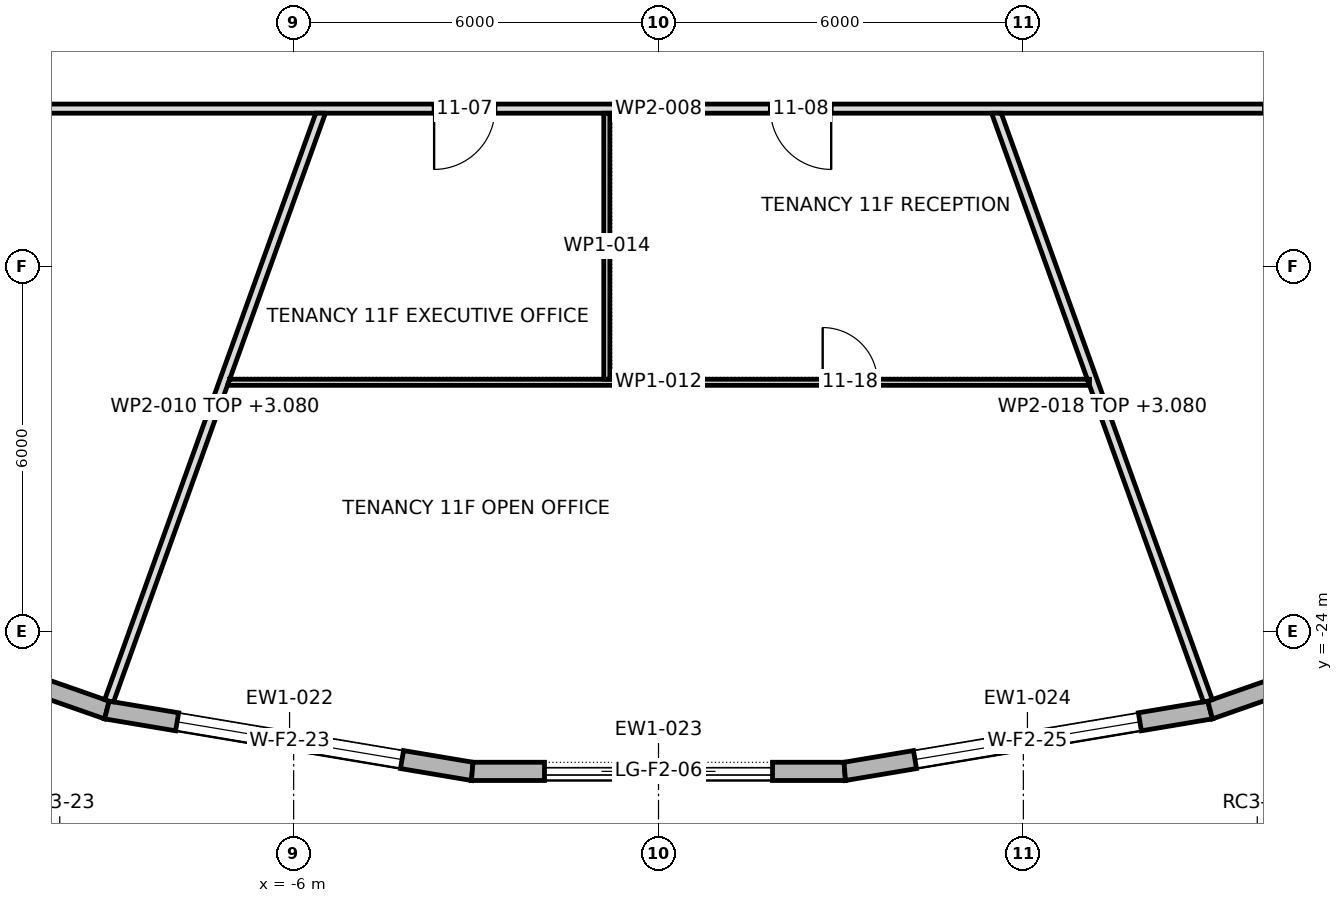
"""IFC4 building model, lengths in metres.
Left out: names, types, materials, properties, quantities, classifications, styles, units other than length and angle.
Written with IfcOpenShell. Run it as: python <this file> out.ifc"""

import sys

from ifc_helpers import new_model, si_unit, direction, frame, frame_2d, origin, place, context, subcontext, project, spatial, polyline, rectangle, outline, extrude, element, fill, save


model = new_model("IFC4")
c1 = context("Model", 3, precision=1e-05, world=origin(), true_north=direction((0.0, 1.0)))
c2 = subcontext(c1, "Body", "Model", "MODEL_VIEW")
j1 = project(units=[si_unit("LENGTHUNIT", "METRE"), si_unit("PLANEANGLEUNIT", "RADIAN")], contexts=[c1])
p1 = place(None, origin())
s1 = spatial("IfcSite", under=j1, at=p1, CompositionType="ELEMENT")
p2 = place(p1, origin())
s2 = spatial("IfcBuilding", under=s1, at=p2, CompositionType="ELEMENT")
p3 = place(p2, frame((0.0, 0.0, 163.3)))
s3 = spatial("IfcBuildingStorey", under=s2, at=p3, CompositionType="ELEMENT", Elevation=163.3)
p4 = place(p3, frame((-14.732, -23.31, 0.0), z_axis=(0.0, 0.0, 1.0), x_axis=(0.943944636678, -0.330103806228, 0.0)))
e1 = element("IfcWall", 1, at=p4, inside=s3, PredefinedType="STANDARD", context=c2, shape_type="SweptSolid", body=[
    extrude(outline(polyline([(-0.013, -0.15), (6.01, -0.15), (5.985, 0.15), (0.013, 0.15), (-0.013, -0.15)])), origin(), (0.0, 0.0, 1.0), 3.85),
])
p5 = place(p4, frame((1.124, 0.0, 0.6)))
e2 = element("IfcOpeningElement", 2, at=p5, cuts=e1, PredefinedType="OPENING", context=c2, shape_type="SweptSolid", body=[
    extrude(rectangle(XDim=3.75, YDim=2.85, at=frame_2d((1.875, 1.425))), frame((0.0, 0.162, 0.0), z_axis=(0.0, -1.0, 0.0), x_axis=(1.0, 0.0, 0.0)), (0.0, 0.0, 1.0), 0.324),
])
p6 = place(p3, frame((-9.071, -25.29, 0.0), z_axis=(0.0, 0.0, 1.0), x_axis=(0.98618955457, -0.165620537547, 0.0)))
e3 = element("IfcWall", 3, at=p6, inside=s3, PredefinedType="STANDARD", context=c2, shape_type="SweptSolid", body=[
    extrude(outline(polyline([(-0.013, -0.15), (6.105, -0.15), (6.08, 0.15), (0.013, 0.15), (-0.013, -0.15)])), origin(), (0.0, 0.0, 1.0), 3.85),
])
p7 = place(p6, frame((1.171, 0.0, 0.6)))
e4 = element("IfcOpeningElement", 4, at=p7, cuts=e3, PredefinedType="OPENING", context=c2, shape_type="SweptSolid", body=[
    extrude(rectangle(XDim=3.75, YDim=2.85, at=frame_2d((1.875, 1.425))), frame((0.0, 0.162, 0.0), z_axis=(0.0, -1.0, 0.0), x_axis=(1.0, 0.0, 0.0)), (0.0, 0.0, 1.0), 0.324),
])
p8 = place(p3, frame((-3.063, -26.299, 0.0), z_axis=(0.0, 0.0, 1.0), x_axis=(1.0, 0.0, 0.0)))
e5 = element("IfcWall", 5, at=p8, inside=s3, PredefinedType="STANDARD", context=c2, shape_type="SweptSolid", body=[
    extrude(outline(polyline([(-0.012, -0.15), (6.138, -0.15), (6.114, 0.15), (0.012, 0.15), (-0.012, -0.15)])), origin(), (0.0, 0.0, 1.0), 3.85),
])
p9 = place(p8, frame((1.188, 0.0, 0.0)))
e6 = element("IfcOpeningElement", 6, at=p9, cuts=e5, PredefinedType="OPENING", context=c2, shape_type="SweptSolid", body=[
    extrude(rectangle(XDim=3.75, YDim=3.45, at=frame_2d((1.875, 1.725))), frame((0.0, 0.162, 0.0), z_axis=(0.0, -1.0, 0.0), x_axis=(1.0, 0.0, 0.0)), (0.0, 0.0, 1.0), 0.324),
])
p10 = place(p3, frame((3.063, -26.299, 0.0), z_axis=(0.0, 0.0, 1.0), x_axis=(0.98618955457, 0.165620537547, 0.0)))
e7 = element("IfcWall", 7, at=p10, inside=s3, PredefinedType="STANDARD", context=c2, shape_type="SweptSolid", body=[
    extrude(outline(polyline([(-0.012, -0.15), (6.105, -0.15), (6.08, 0.15), (0.012, 0.15), (-0.012, -0.15)])), origin(), (0.0, 0.0, 1.0), 3.85),
])
p11 = place(p10, frame((1.171, 0.0, 0.6)))
e8 = element("IfcOpeningElement", 8, at=p11, cuts=e7, PredefinedType="OPENING", context=c2, shape_type="SweptSolid", body=[
    extrude(rectangle(XDim=3.75, YDim=2.85, at=frame_2d((1.875, 1.425))), frame((0.0, 0.162, 0.0), z_axis=(0.0, -1.0, 0.0), x_axis=(1.0, 0.0, 0.0)), (0.0, 0.0, 1.0), 0.324),
])
p12 = place(p3, frame((9.071, -25.29, 0.0), z_axis=(0.0, 0.0, 1.0), x_axis=(0.943944636678, 0.330103806228, 0.0)))
e9 = element("IfcWall", 9, at=p12, inside=s3, PredefinedType="STANDARD", context=c2, shape_type="SweptSolid", body=[
    extrude(outline(polyline([(-0.013, -0.15), (6.011, -0.15), (5.984, 0.15), (0.013, 0.15), (-0.013, -0.15)])), origin(), (0.0, 0.0, 1.0), 3.85),
])
p13 = place(p12, frame((1.124, 0.0, 0.6)))
e10 = element("IfcOpeningElement", 10, at=p13, cuts=e9, PredefinedType="OPENING", context=c2, shape_type="SweptSolid", body=[
    extrude(rectangle(XDim=3.75, YDim=2.85, at=frame_2d((1.875, 1.425))), frame((0.0, 0.162, 0.0), z_axis=(0.0, -1.0, 0.0), x_axis=(1.0, 0.0, 0.0)), (0.0, 0.0, 1.0), 0.324),
])
p14 = place(p3, frame((-15.475, -15.4, 0.0), z_axis=(0.0, 0.0, 1.0), x_axis=(1.0, 0.0, 0.0)))
e11 = element("IfcWall", 11, at=p14, inside=s3, PredefinedType="PARTITIONING", context=c2, shape_type="SweptSolid", body=[
    extrude(outline(polyline([(0.0, -0.075), (1.935, -0.075), (3.869, -0.075), (5.803, -0.075), (7.738, -0.075), (9.672, -0.075), (11.606, -0.075), (13.541, -0.075), (15.475, -0.075), (17.409, -0.075), (19.344, -0.075), (21.278, -0.075), (23.212, -0.075), (25.147, -0.075), (27.081, -0.075), (29.016, -0.075), (30.95, -0.075), (30.8, 0.075), (28.885, 0.075), (26.969, 0.075), (25.053, 0.075), (23.138, 0.075), (21.222, 0.075), (19.306, 0.075), (17.391, 0.075), (15.475, 0.075), (13.56, 0.075), (11.644, 0.075), (9.728, 0.075), (7.812, 0.075), (5.897, 0.075), (3.981, 0.075), (2.066, 0.075), (0.15, 0.075), (0.0, -0.075)])), origin(), (0.0, 0.0, 1.0), 3.85),
])
p15 = place(p14, frame((11.785, 0.0, 0.0)))
e12 = element("IfcOpeningElement", 12, at=p15, cuts=e11, PredefinedType="OPENING", context=c2, shape_type="SweptSolid", body=[
    extrude(rectangle(XDim=1.0, YDim=2.1, at=frame_2d((0.5, 1.05))), frame((0.0, 0.087, 0.0), z_axis=(0.0, -1.0, 0.0), x_axis=(1.0, 0.0, 0.0)), (0.0, 0.0, 1.0), 0.174),
])
p16 = place(p14, frame((17.315, 0.0, 0.0)))
e13 = element("IfcOpeningElement", 13, at=p16, cuts=e11, PredefinedType="OPENING", context=c2, shape_type="SweptSolid", body=[
    extrude(rectangle(XDim=1.0, YDim=2.1, at=frame_2d((0.5, 1.05))), frame((0.0, 0.087, 0.0), z_axis=(0.0, -1.0, 0.0), x_axis=(1.0, 0.0, 0.0)), (0.0, 0.0, 1.0), 0.174),
])
p17 = place(p14, frame((25.44, 0.0, 0.0)))
e14 = element("IfcOpeningElement", 14, at=p17, cuts=e11, PredefinedType="OPENING", context=c2, shape_type="SweptSolid", body=[
    extrude(rectangle(XDim=1.0, YDim=2.1, at=frame_2d((0.5, 1.05))), frame((0.0, 0.087, 0.0), z_axis=(0.0, -1.0, 0.0), x_axis=(1.0, 0.0, 0.0)), (0.0, 0.0, 1.0), 0.174),
])
p18 = place(p3, frame((-9.037, -25.143, 0.0), z_axis=(0.0, 0.0, 1.0), x_axis=(0.338668278724, 0.940905838533, 0.0)))
e15 = element("IfcWall", 15, at=p18, inside=s3, PredefinedType="PARTITIONING", context=c2, shape_type="SweptSolid", body=[
    extrude(outline(polyline([(0.014, -0.075), (1.893, -0.075), (3.772, -0.075), (5.651, -0.075), (5.653, -0.074), (5.653, -0.075), (7.203, -0.075), (8.752, -0.075), (10.302, -0.075), (10.302, -0.074), (10.3, -0.069), (10.3, -0.069), (10.249, 0.075), (8.541, 0.075), (6.832, 0.075), (5.124, 0.075), (3.416, 0.075), (1.708, 0.075), (0.0, 0.075), (0.0, 0.054), (0.0, -0.003), (0.014, -0.075)])), origin(), (0.0, 0.0, 1.0), 3.08),
])
p19 = place(p3, frame((-7.087, -19.9, 0.0), z_axis=(0.0, 0.0, 1.0), x_axis=(1.0, 0.0, 0.0)))
e16 = element("IfcWall", 16, at=p19, inside=s3, PredefinedType="PARTITIONING", context=c2, shape_type="SweptSolid", body=[
    extrude(outline(polyline([(14.175, -0.05), (14.175, -0.049), (14.139, 0.05), (12.176, 0.05), (10.213, 0.05), (8.25, 0.05), (6.287, 0.05), (6.287, 0.05), (6.188, 0.05), (6.188, 0.05), (4.649, 0.05), (3.112, 0.05), (1.573, 0.05), (0.036, 0.05), (0.0, -0.049), (0.0, -0.05), (1.772, -0.05), (3.544, -0.05), (5.315, -0.05), (7.087, -0.05), (8.859, -0.05), (10.631, -0.05), (12.403, -0.05), (14.175, -0.05)])), origin(), (0.0, 0.0, 1.0), 3.85),
])
p20 = place(p19, frame((9.788, 0.0, 0.0)))
e17 = element("IfcOpeningElement", 17, at=p20, cuts=e16, PredefinedType="OPENING", context=c2, shape_type="SweptSolid", body=[
    extrude(rectangle(XDim=0.9, YDim=2.1, at=frame_2d((0.45, 1.05))), frame((0.0, 0.062, 0.0), z_axis=(0.0, -1.0, 0.0), x_axis=(1.0, 0.0, 0.0)), (0.0, 0.0, 1.0), 0.124),
])
p21 = place(p3, frame((-0.85, -15.475, 0.0), z_axis=(0.0, 0.0, 1.0), x_axis=(0.0, -1.0, 0.0)))
e18 = element("IfcWall", 18, at=p21, inside=s3, PredefinedType="PARTITIONING", context=c2, shape_type="SweptSolid", body=[
    extrude(rectangle(XDim=4.375, YDim=0.1, at=frame_2d((2.188, 0.0))), origin(), (0.0, 0.0, 1.0), 3.85),
])
p22 = place(p3, frame((5.548, -15.45, 0.0), z_axis=(0.0, 0.0, 1.0), x_axis=(0.338668278724, -0.940905838533, 0.0)))
e19 = element("IfcWall", 19, at=p22, inside=s3, PredefinedType="PARTITIONING", context=c2, shape_type="SweptSolid", body=[
    extrude(outline(polyline([(0.0, -0.075), (1.55, -0.075), (3.1, -0.075), (4.649, -0.075), (4.661, -0.042), (4.754, -0.075), (6.599, -0.075), (8.444, -0.075), (10.289, -0.075), (10.302, -0.003), (10.302, 0.064), (10.302, 0.075), (8.594, 0.075), (6.886, 0.075), (5.178, 0.075), (3.47, 0.075), (1.762, 0.075), (0.054, 0.075), (0.0, -0.074), (0.0, -0.075)])), origin(), (0.0, 0.0, 1.0), 3.08),
])
p23 = place(p7, origin())
e20 = element("IfcWindow", 20, at=p23, inside=s3, PartitioningType="TRIPLE_PANEL_VERTICAL", PredefinedType="WINDOW", context=c2, shape_type="SweptSolid", body=[
    extrude(rectangle(XDim=3.75, YDim=2.85, at=frame_2d((1.875, 1.425))), frame((0.0, 0.03, 0.0), z_axis=(0.0, -1.0, 0.0), x_axis=(1.0, 0.0, 0.0)), (0.0, 0.0, 1.0), 0.06),
])
fill(e4, e20)
p24 = place(p9, origin())
e21 = element("IfcDoor", 21, at=p24, inside=s3, OperationType="DOUBLE_DOOR_SLIDING", PredefinedType="DOOR", context=c2, shape_type="SweptSolid", body=[
    extrude(rectangle(XDim=3.75, YDim=3.45, at=frame_2d((1.875, 1.725))), frame((0.0, 0.025, 0.0), z_axis=(0.0, -1.0, 0.0), x_axis=(1.0, 0.0, 0.0)), (0.0, 0.0, 1.0), 0.05),
])
fill(e6, e21)
p25 = place(p11, origin())
e22 = element("IfcWindow", 22, at=p25, inside=s3, PartitioningType="TRIPLE_PANEL_VERTICAL", PredefinedType="WINDOW", context=c2, shape_type="SweptSolid", body=[
    extrude(rectangle(XDim=3.75, YDim=2.85, at=frame_2d((1.875, 1.425))), frame((0.0, 0.03, 0.0), z_axis=(0.0, -1.0, 0.0), x_axis=(1.0, 0.0, 0.0)), (0.0, 0.0, 1.0), 0.06),
])
fill(e8, e22)
p26 = place(p15, frame((1.0, 0.0, 0.0), z_axis=(0.0, 0.0, 1.0), x_axis=(-1.0, 0.0, 0.0)))
e23 = element("IfcDoor", 23, at=p26, inside=s3, OperationType="SINGLE_SWING_LEFT", PredefinedType="DOOR", context=c2, shape_type="SweptSolid", body=[
    extrude(rectangle(XDim=1.0, YDim=2.1, at=frame_2d((0.5, 1.05))), frame((0.0, 0.025, 0.0), z_axis=(0.0, -1.0, 0.0), x_axis=(1.0, 0.0, 0.0)), (0.0, 0.0, 1.0), 0.05),
])
fill(e12, e23)
p27 = place(p16, frame((1.0, 0.0, 0.0), z_axis=(0.0, 0.0, 1.0), x_axis=(-1.0, 0.0, 0.0)))
e24 = element("IfcDoor", 24, at=p27, inside=s3, OperationType="SINGLE_SWING_RIGHT", PredefinedType="DOOR", context=c2, shape_type="SweptSolid", body=[
    extrude(rectangle(XDim=1.0, YDim=2.1, at=frame_2d((0.5, 1.05))), frame((0.0, 0.025, 0.0), z_axis=(0.0, -1.0, 0.0), x_axis=(1.0, 0.0, 0.0)), (0.0, 0.0, 1.0), 0.05),
])
fill(e13, e24)
p28 = place(p20, origin())
e25 = element("IfcDoor", 25, at=p28, inside=s3, OperationType="SINGLE_SWING_RIGHT", PredefinedType="DOOR", context=c2, shape_type="SweptSolid", body=[
    extrude(rectangle(XDim=0.9, YDim=2.1, at=frame_2d((0.45, 1.05))), frame((0.0, 0.025, 0.0), z_axis=(0.0, -1.0, 0.0), x_axis=(1.0, 0.0, 0.0)), (0.0, 0.0, 1.0), 0.05),
])
fill(e17, e25)
save(model, sys.argv[1])
